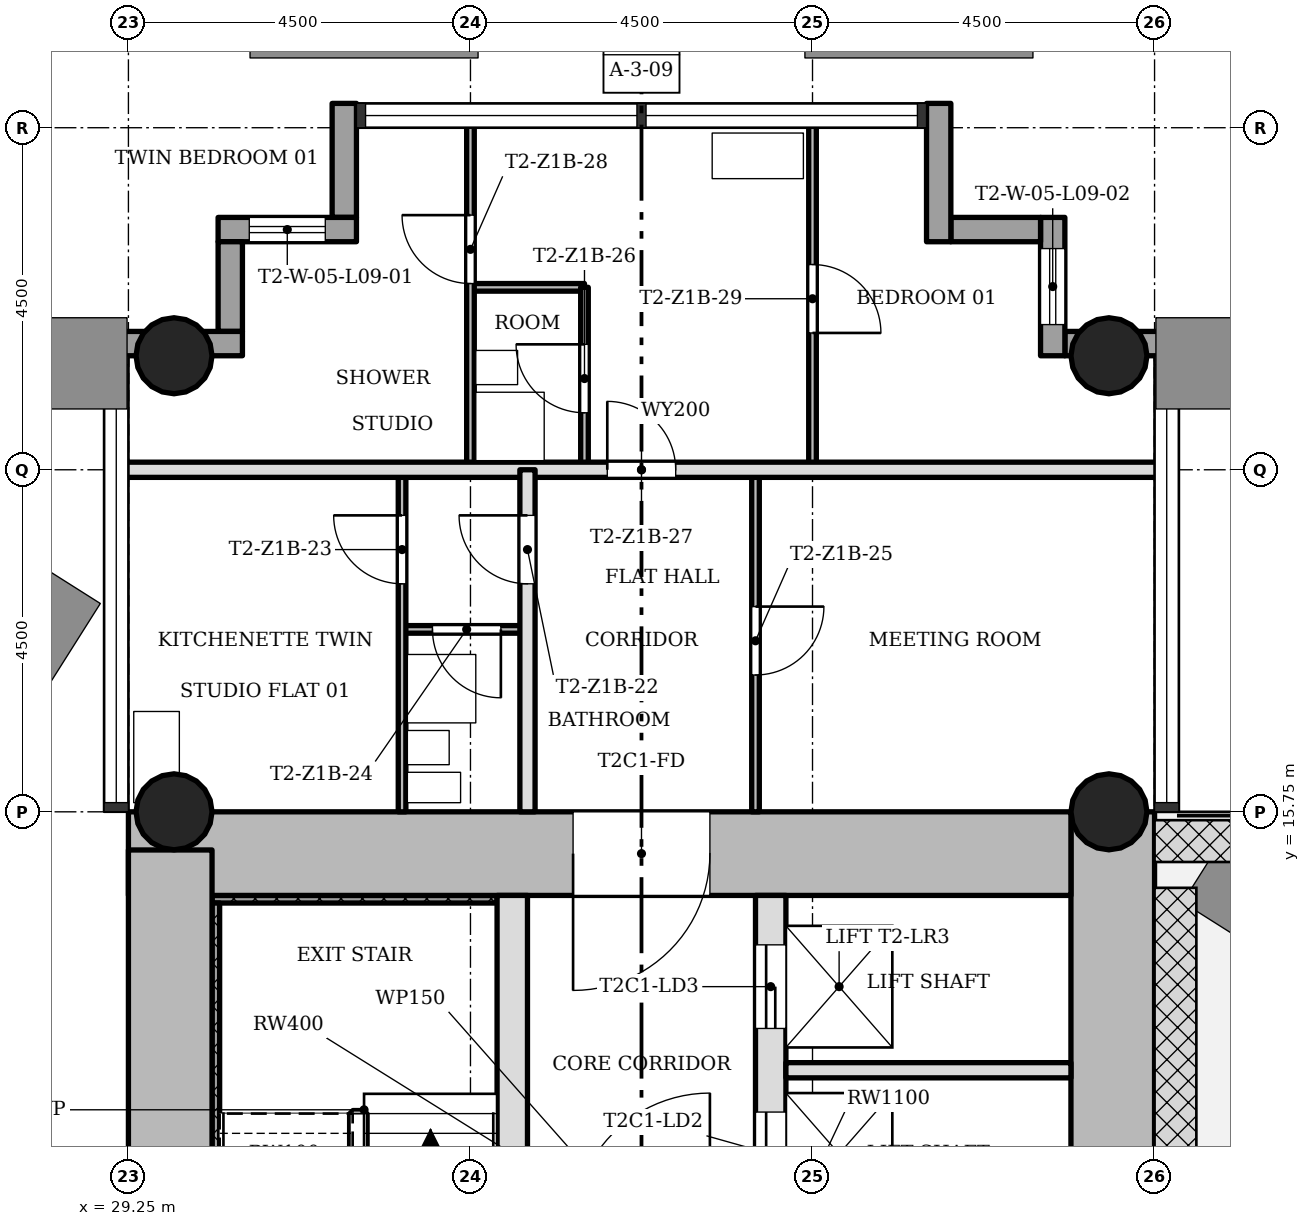
"""IFC4 building model, lengths in metres.
Left out: names, types, materials, properties, quantities, classifications, styles, units other than length and angle.
Written with IfcOpenShell. Run it as: python <this file> out.ifc"""

import sys

from ifc_helpers import new_model, si_unit, direction, frame, frame_2d, origin, origin_2d, place, context, subcontext, project, spatial, rectangle, hollow_circle, extrude, element, fill, save


model = new_model("IFC4")
c1 = context("Model", 3, precision=1e-05, world=origin(), true_north=direction((0.0, 1.0)))
c2 = subcontext(c1, "Body", "Model", "MODEL_VIEW")
j1 = project(units=[si_unit("LENGTHUNIT", "METRE"), si_unit("PLANEANGLEUNIT", "RADIAN")], contexts=[c1])
p1 = place(None, origin())
s1 = spatial("IfcSite", under=j1, at=p1, CompositionType="ELEMENT")
p2 = place(p1, origin())
s2 = spatial("IfcBuilding", under=s1, at=p2, CompositionType="ELEMENT")
p3 = place(p2, frame((0.0, 0.0, 38.1)))
s3 = spatial("IfcBuildingStorey", under=s2, at=p3, CompositionType="ELEMENT", Elevation=38.1)
p4 = place(p3, frame((42.2, 7.85, 0.0), z_axis=(0.0, 0.0, 1.0), x_axis=(0.0, 1.0, 0.0)))
e1 = element("IfcWall", 1, at=p4, inside=s3, PredefinedType="SHEAR", context=c2, shape_type="SweptSolid", body=[
    extrude(rectangle(XDim=7.9, YDim=1.1, at=frame_2d((3.95, 0.0))), origin(), (0.0, 0.0, 1.0), 3.4),
])
p5 = place(p3, frame((41.65, 15.2, 0.0), z_axis=(0.0, 0.0, 1.0), x_axis=(-1.0, 0.0, 0.0)))
e2 = element("IfcWall", 2, at=p5, inside=s3, PredefinedType="SHEAR", context=c2, shape_type="SweptSolid", body=[
    extrude(rectangle(XDim=12.4, YDim=1.1, at=frame_2d((6.2, 0.0))), origin(), (0.0, 0.0, 1.0), 3.4),
])
p6 = place(p5, frame((4.75, 0.0, 0.0)))
e3 = element("IfcOpeningElement", 3, at=p6, cuts=e2, PredefinedType="OPENING", context=c2, shape_type="SweptSolid", body=[
    extrude(rectangle(XDim=1.8, YDim=2.1, at=frame_2d((0.9, 1.05))), frame((0.0, 0.56, 0.0), z_axis=(0.0, -1.0, 0.0), x_axis=(1.0, 0.0, 0.0)), (0.0, 0.0, 1.0), 1.12),
])
p7 = place(p3, frame((29.8, 15.248, 0.0), z_axis=(0.0, 0.0, 1.0), x_axis=(0.0, -1.0, 0.0)))
e4 = element("IfcWall", 4, at=p7, inside=s3, PredefinedType="SHEAR", context=c2, shape_type="SweptSolid", body=[
    extrude(rectangle(XDim=8.596, YDim=1.1, at=frame_2d((4.298, 0.0))), origin(), (0.0, 0.0, 1.0), 3.4),
])
p8 = place(p3, frame((34.3, 7.85, 0.0), z_axis=(0.0, 0.0, 1.0), x_axis=(0.0, 1.0, 0.0)))
e5 = element("IfcWall", 5, at=p8, inside=s3, PredefinedType="SHEAR", context=c2, shape_type="SweptSolid", body=[
    extrude(rectangle(XDim=6.8, YDim=0.4, at=frame_2d((3.4, 0.0))), origin(), (0.0, 0.0, 1.0), 3.4),
])
p9 = place(p8, frame((0.55, 0.0, 0.0)))
e6 = element("IfcOpeningElement", 6, at=p9, cuts=e5, PredefinedType="OPENING", context=c2, shape_type="SweptSolid", body=[
    extrude(rectangle(XDim=0.9, YDim=2.1, at=frame_2d((0.45, 1.05))), frame((0.0, 0.21, 0.0), z_axis=(0.0, -1.0, 0.0), x_axis=(1.0, 0.0, 0.0)), (0.0, 0.0, 1.0), 0.42),
])
p10 = place(p3, frame((37.7, 7.85, 0.0), z_axis=(0.0, 0.0, 1.0), x_axis=(0.0, 1.0, 0.0)))
e7 = element("IfcWall", 7, at=p10, inside=s3, PredefinedType="SHEAR", context=c2, shape_type="SweptSolid", body=[
    extrude(rectangle(XDim=6.8, YDim=0.4, at=frame_2d((3.4, 0.0))), origin(), (0.0, 0.0, 1.0), 3.4),
])
p11 = place(p10, frame((0.65, 0.0, 0.0)))
e8 = element("IfcOpeningElement", 8, at=p11, cuts=e7, PredefinedType="OPENING", context=c2, shape_type="SweptSolid", body=[
    extrude(rectangle(XDim=1.1, YDim=2.1, at=frame_2d((0.55, 1.05))), frame((0.0, 0.21, 0.0), z_axis=(0.0, -1.0, 0.0), x_axis=(1.0, 0.0, 0.0)), (0.0, 0.0, 1.0), 0.42),
])
p12 = place(p10, frame((2.85, 0.0, 0.0)))
e9 = element("IfcOpeningElement", 9, at=p12, cuts=e7, PredefinedType="OPENING", context=c2, shape_type="SweptSolid", body=[
    extrude(rectangle(XDim=1.1, YDim=2.1, at=frame_2d((0.55, 1.05))), frame((0.0, 0.21, 0.0), z_axis=(0.0, -1.0, 0.0), x_axis=(1.0, 0.0, 0.0)), (0.0, 0.0, 1.0), 0.42),
])
p13 = place(p10, frame((5.05, 0.0, 0.0)))
e10 = element("IfcOpeningElement", 10, at=p13, cuts=e7, PredefinedType="OPENING", context=c2, shape_type="SweptSolid", body=[
    extrude(rectangle(XDim=1.1, YDim=2.1, at=frame_2d((0.55, 1.05))), frame((0.0, 0.21, 0.0), z_axis=(0.0, -1.0, 0.0), x_axis=(1.0, 0.0, 0.0)), (0.0, 0.0, 1.0), 0.42),
])
for number, where, z_axis, x_axis in (
    (11, (42.15, 15.75, 0.0), (0.0, 0.0, 1.0), (1.0, 0.0, 0.0)),
    (12, (29.85, 15.75, 0.0), (0.0, 0.0, 1.0), (1.0, 0.0, 0.0)),
    (13, (42.15, 21.75, 0.0), (0.0, 0.0, 1.0), (1.0, 0.0, 0.0)),
    (14, (29.85, 21.75, 0.0), (0.0, 0.0, 1.0), (1.0, 0.0, 0.0)),
):
    element("IfcColumn", number, at=place(p3, frame(where, z_axis=z_axis, x_axis=x_axis)), inside=s3, PredefinedType="COLUMN", context=c2, shape_type="SweptSolid", body=[
        extrude(hollow_circle(Radius=0.5, WallThickness=0.036, at=origin_2d()), origin(), (0.0, 0.0, 1.0), 3.4),
    ])
p14 = place(p3, frame((43.07, 21.91, -0.3), z_axis=(0.0, 0.0, 1.0), x_axis=(-1.0, 0.0, 0.0)))
e15 = element("IfcWall", 15, at=p14, inside=s3, PredefinedType="STANDARD", context=c2, shape_type="SweptSolid", body=[
    extrude(rectangle(XDim=1.5, YDim=0.32, at=frame_2d((0.75, 0.0))), origin(), (0.0, 0.0, 1.0), 3.4),
])
p15 = place(p3, frame((41.41, 21.75, -0.3), z_axis=(0.0, 0.0, 1.0), x_axis=(0.0, 1.0, 0.0)))
e16 = element("IfcWall", 16, at=p15, inside=s3, PredefinedType="STANDARD", context=c2, shape_type="SweptSolid", body=[
    extrude(rectangle(XDim=1.82, YDim=0.32, at=frame_2d((0.91, 0.0))), origin(), (0.0, 0.0, 1.0), 3.4),
])
p16 = place(p15, frame((0.41, 0.0, 1.2)))
e17 = element("IfcOpeningElement", 17, at=p16, cuts=e16, PredefinedType="OPENING", context=c2, shape_type="SweptSolid", body=[
    extrude(rectangle(XDim=1.0, YDim=1.5, at=frame_2d((0.5, 0.75))), frame((0.0, 0.17, 0.0), z_axis=(0.0, -1.0, 0.0), x_axis=(1.0, 0.0, 0.0)), (0.0, 0.0, 1.0), 0.34),
])
p17 = place(p3, frame((41.25, 23.41, -0.3), z_axis=(0.0, 0.0, 1.0), x_axis=(-1.0, 0.0, 0.0)))
e18 = element("IfcWall", 18, at=p17, inside=s3, PredefinedType="STANDARD", context=c2, shape_type="SweptSolid", body=[
    extrude(rectangle(XDim=1.18, YDim=0.32, at=frame_2d((0.59, 0.0))), origin(), (0.0, 0.0, 1.0), 3.4),
])
p18 = place(p3, frame((39.91, 23.25, -0.3), z_axis=(0.0, 0.0, 1.0), x_axis=(0.0, 1.0, 0.0)))
e19 = element("IfcWall", 19, at=p18, inside=s3, PredefinedType="STANDARD", context=c2, shape_type="SweptSolid", body=[
    extrude(rectangle(XDim=1.82, YDim=0.32, at=frame_2d((0.91, 0.0))), origin(), (0.0, 0.0, 1.0), 3.4),
])
p19 = place(p3, frame((32.09, 25.07, -0.3), z_axis=(0.0, 0.0, 1.0), x_axis=(0.0, -1.0, 0.0)))
e20 = element("IfcWall", 20, at=p19, inside=s3, PredefinedType="STANDARD", context=c2, shape_type="SweptSolid", body=[
    extrude(rectangle(XDim=1.5, YDim=0.32, at=frame_2d((0.75, 0.0))), origin(), (0.0, 0.0, 1.0), 3.4),
])
p20 = place(p3, frame((32.25, 23.41, -0.3), z_axis=(0.0, 0.0, 1.0), x_axis=(-1.0, 0.0, 0.0)))
e21 = element("IfcWall", 21, at=p20, inside=s3, PredefinedType="STANDARD", context=c2, shape_type="SweptSolid", body=[
    extrude(rectangle(XDim=1.82, YDim=0.32, at=frame_2d((0.91, 0.0))), origin(), (0.0, 0.0, 1.0), 3.4),
])
p21 = place(p20, frame((0.41, 0.0, 1.2)))
e22 = element("IfcOpeningElement", 22, at=p21, cuts=e21, PredefinedType="OPENING", context=c2, shape_type="SweptSolid", body=[
    extrude(rectangle(XDim=1.0, YDim=1.5, at=frame_2d((0.5, 0.75))), frame((0.0, 0.17, 0.0), z_axis=(0.0, -1.0, 0.0), x_axis=(1.0, 0.0, 0.0)), (0.0, 0.0, 1.0), 0.34),
])
p22 = place(p3, frame((30.59, 23.25, -0.3), z_axis=(0.0, 0.0, 1.0), x_axis=(0.0, -1.0, 0.0)))
e23 = element("IfcWall", 23, at=p22, inside=s3, PredefinedType="STANDARD", context=c2, shape_type="SweptSolid", body=[
    extrude(rectangle(XDim=1.18, YDim=0.32, at=frame_2d((0.59, 0.0))), origin(), (0.0, 0.0, 1.0), 3.4),
])
p23 = place(p3, frame((30.75, 21.91, -0.3), z_axis=(0.0, 0.0, 1.0), x_axis=(-1.0, 0.0, 0.0)))
e24 = element("IfcWall", 24, at=p23, inside=s3, PredefinedType="STANDARD", context=c2, shape_type="SweptSolid", body=[
    extrude(rectangle(XDim=1.82, YDim=0.32, at=frame_2d((0.91, 0.0))), origin(), (0.0, 0.0, 1.0), 3.4),
])
p24 = place(p3, frame((41.65, 12.35, 0.0), z_axis=(0.0, 0.0, 1.0), x_axis=(-1.0, 0.0, 0.0)))
e25 = element("IfcWall", 25, at=p24, inside=s3, PredefinedType="SOLIDWALL", context=c2, shape_type="SweptSolid", body=[
    extrude(rectangle(XDim=3.75, YDim=0.2, at=frame_2d((1.875, 0.0))), origin(), (0.0, 0.0, 1.0), 3.0),
])
p25 = place(p3, frame((34.5, 18.15, 0.0), z_axis=(0.0, 0.0, 1.0), x_axis=(-1.0, 0.0, 0.0)))
e26 = element("IfcWall", 26, at=p25, inside=s3, PredefinedType="PARTITIONING", context=c2, shape_type="SweptSolid", body=[
    extrude(rectangle(XDim=1.65, YDim=0.1, at=frame_2d((0.825, 0.0))), origin(), (0.0, 0.0, 1.0), 3.0),
])
p26 = place(p25, frame((0.35, 0.0, 0.0)))
e27 = element("IfcOpeningElement", 27, at=p26, cuts=e26, PredefinedType="OPENING", context=c2, shape_type="SweptSolid", body=[
    extrude(rectangle(XDim=0.9, YDim=2.1, at=frame_2d((0.45, 1.05))), frame((0.0, 0.06, 0.0), z_axis=(0.0, -1.0, 0.0), x_axis=(1.0, 0.0, 0.0)), (0.0, 0.0, 1.0), 0.12),
])
p27 = place(p3, frame((42.85, 20.25, 0.0), z_axis=(0.0, 0.0, 1.0), x_axis=(-1.0, 0.0, 0.0)))
e28 = element("IfcWall", 28, at=p27, inside=s3, PredefinedType="SOLIDWALL", context=c2, shape_type="SweptSolid", body=[
    extrude(rectangle(XDim=13.7, YDim=0.2, at=frame_2d((6.85, 0.0))), origin(), (0.0, 0.0, 1.0), 3.0),
])
p28 = place(p27, frame((6.4, 0.0, 0.0)))
e29 = element("IfcOpeningElement", 29, at=p28, cuts=e28, PredefinedType="OPENING", context=c2, shape_type="SweptSolid", body=[
    extrude(rectangle(XDim=0.9, YDim=2.1, at=frame_2d((0.45, 1.05))), frame((0.0, 0.11, 0.0), z_axis=(0.0, -1.0, 0.0), x_axis=(1.0, 0.0, 0.0)), (0.0, 0.0, 1.0), 0.22),
])
p29 = place(p3, frame((35.25, 22.65, 0.0), z_axis=(0.0, 0.0, 1.0), x_axis=(-1.0, 0.0, 0.0)))
e30 = element("IfcWall", 30, at=p29, inside=s3, PredefinedType="PARTITIONING", context=c2, shape_type="SweptSolid", body=[
    extrude(rectangle(XDim=1.5, YDim=0.1, at=frame_2d((0.75, 0.0))), origin(), (0.0, 0.0, 1.0), 3.0),
])
p30 = place(p3, frame((38.25, 20.25, 0.0), z_axis=(0.0, 0.0, 1.0), x_axis=(0.0, 1.0, 0.0)))
e31 = element("IfcWall", 31, at=p30, inside=s3, PredefinedType="PARTITIONING", context=c2, shape_type="SweptSolid", body=[
    extrude(rectangle(XDim=4.6, YDim=0.1, at=frame_2d((2.3, 0.0))), origin(), (0.0, 0.0, 1.0), 3.0),
])
p31 = place(p30, frame((1.8, 0.0, 0.0)))
e32 = element("IfcOpeningElement", 32, at=p31, cuts=e31, PredefinedType="OPENING", context=c2, shape_type="SweptSolid", body=[
    extrude(rectangle(XDim=0.9, YDim=2.1, at=frame_2d((0.45, 1.05))), frame((0.0, 0.06, 0.0), z_axis=(0.0, -1.0, 0.0), x_axis=(1.0, 0.0, 0.0)), (0.0, 0.0, 1.0), 0.12),
])
p32 = place(p3, frame((37.5, 15.75, 0.0), z_axis=(0.0, 0.0, 1.0), x_axis=(0.0, 1.0, 0.0)))
e33 = element("IfcWall", 33, at=p32, inside=s3, PredefinedType="PARTITIONING", context=c2, shape_type="SweptSolid", body=[
    extrude(rectangle(XDim=4.5, YDim=0.1, at=frame_2d((2.25, 0.0))), origin(), (0.0, 0.0, 1.0), 3.0),
])
p33 = place(p32, frame((1.8, 0.0, 0.0)))
e34 = element("IfcOpeningElement", 34, at=p33, cuts=e33, PredefinedType="OPENING", context=c2, shape_type="SweptSolid", body=[
    extrude(rectangle(XDim=0.9, YDim=2.1, at=frame_2d((0.45, 1.05))), frame((0.0, 0.06, 0.0), z_axis=(0.0, -1.0, 0.0), x_axis=(1.0, 0.0, 0.0)), (0.0, 0.0, 1.0), 0.12),
])
p34 = place(p3, frame((35.25, 20.25, 0.0), z_axis=(0.0, 0.0, 1.0), x_axis=(0.0, 1.0, 0.0)))
e35 = element("IfcWall", 35, at=p34, inside=s3, PredefinedType="PARTITIONING", context=c2, shape_type="SweptSolid", body=[
    extrude(rectangle(XDim=2.4, YDim=0.1, at=frame_2d((1.2, 0.0))), origin(), (0.0, 0.0, 1.0), 3.0),
])
p35 = place(p34, frame((0.75, 0.0, 0.0)))
e36 = element("IfcOpeningElement", 36, at=p35, cuts=e35, PredefinedType="OPENING", context=c2, shape_type="SweptSolid", body=[
    extrude(rectangle(XDim=0.9, YDim=2.1, at=frame_2d((0.45, 1.05))), frame((0.0, 0.06, 0.0), z_axis=(0.0, -1.0, 0.0), x_axis=(1.0, 0.0, 0.0)), (0.0, 0.0, 1.0), 0.12),
])
p36 = place(p3, frame((34.5, 15.75, 0.0), z_axis=(0.0, 0.0, 1.0), x_axis=(0.0, 1.0, 0.0)))
e37 = element("IfcWall", 37, at=p36, inside=s3, PredefinedType="SOLIDWALL", context=c2, shape_type="SweptSolid", body=[
    extrude(rectangle(XDim=4.5, YDim=0.2, at=frame_2d((2.25, 0.0))), origin(), (0.0, 0.0, 1.0), 3.0),
])
p37 = place(p36, frame((3.0, 0.0, 0.0)))
e38 = element("IfcOpeningElement", 38, at=p37, cuts=e37, PredefinedType="OPENING", context=c2, shape_type="SweptSolid", body=[
    extrude(rectangle(XDim=0.9, YDim=2.1, at=frame_2d((0.45, 1.05))), frame((0.0, 0.11, 0.0), z_axis=(0.0, -1.0, 0.0), x_axis=(1.0, 0.0, 0.0)), (0.0, 0.0, 1.0), 0.22),
])
p38 = place(p3, frame((33.75, 20.25, 0.0), z_axis=(0.0, 0.0, 1.0), x_axis=(0.0, 1.0, 0.0)))
e39 = element("IfcWall", 39, at=p38, inside=s3, PredefinedType="PARTITIONING", context=c2, shape_type="SweptSolid", body=[
    extrude(rectangle(XDim=4.6, YDim=0.1, at=frame_2d((2.3, 0.0))), origin(), (0.0, 0.0, 1.0), 3.0),
])
p39 = place(p38, frame((2.45, 0.0, 0.0)))
e40 = element("IfcOpeningElement", 40, at=p39, cuts=e39, PredefinedType="OPENING", context=c2, shape_type="SweptSolid", body=[
    extrude(rectangle(XDim=0.9, YDim=2.1, at=frame_2d((0.45, 1.05))), frame((0.0, 0.06, 0.0), z_axis=(0.0, -1.0, 0.0), x_axis=(1.0, 0.0, 0.0)), (0.0, 0.0, 1.0), 0.12),
])
p40 = place(p3, frame((32.85, 15.75, 0.0), z_axis=(0.0, 0.0, 1.0), x_axis=(0.0, 1.0, 0.0)))
e41 = element("IfcWall", 41, at=p40, inside=s3, PredefinedType="PARTITIONING", context=c2, shape_type="SweptSolid", body=[
    extrude(rectangle(XDim=4.5, YDim=0.1, at=frame_2d((2.25, 0.0))), origin(), (0.0, 0.0, 1.0), 3.0),
])
p41 = place(p40, frame((3.0, 0.0, 0.0)))
e42 = element("IfcOpeningElement", 42, at=p41, cuts=e41, PredefinedType="OPENING", context=c2, shape_type="SweptSolid", body=[
    extrude(rectangle(XDim=0.9, YDim=2.1, at=frame_2d((0.45, 1.05))), frame((0.0, 0.06, 0.0), z_axis=(0.0, -1.0, 0.0), x_axis=(1.0, 0.0, 0.0)), (0.0, 0.0, 1.0), 0.12),
])
p42 = place(p3, frame((34.1, 14.6, 0.0), z_axis=(0.0, 0.0, 1.0), x_axis=(-1.0, 0.0, 0.0)))
e43 = element("IfcWall", 43, at=p42, inside=s3, PredefinedType="SHEAR", context=c2, shape_type="SweptSolid", body=[
    extrude(rectangle(XDim=3.75, YDim=0.1, at=frame_2d((1.875, 0.0))), origin(), (0.0, 0.0, 1.0), 3.4),
])
p43 = place(p3, frame((30.4, 7.95, 0.0), z_axis=(0.0, 0.0, 1.0), x_axis=(0.0, 1.0, 0.0)))
e44 = element("IfcWall", 44, at=p43, inside=s3, PredefinedType="SHEAR", context=c2, shape_type="SweptSolid", body=[
    extrude(rectangle(XDim=6.6, YDim=0.1, at=frame_2d((3.3, 0.0))), origin(), (0.0, 0.0, 1.0), 3.4),
])
p44 = place(p37, origin())
e45 = element("IfcDoor", 45, at=p44, inside=s3, OperationType="SINGLE_SWING_LEFT", PredefinedType="DOOR", context=c2, shape_type="SweptSolid", body=[
    extrude(rectangle(XDim=0.9, YDim=2.1, at=frame_2d((0.45, 1.05))), frame((0.0, 0.025, 0.0), z_axis=(0.0, -1.0, 0.0), x_axis=(1.0, 0.0, 0.0)), (0.0, 0.0, 1.0), 0.05),
])
fill(e38, e45)
p45 = place(p41, origin())
e46 = element("IfcDoor", 46, at=p45, inside=s3, OperationType="SINGLE_SWING_LEFT", PredefinedType="DOOR", context=c2, shape_type="SweptSolid", body=[
    extrude(rectangle(XDim=0.9, YDim=2.1, at=frame_2d((0.45, 1.05))), frame((0.0, 0.025, 0.0), z_axis=(0.0, -1.0, 0.0), x_axis=(1.0, 0.0, 0.0)), (0.0, 0.0, 1.0), 0.05),
])
fill(e42, e46)
p46 = place(p26, origin())
e47 = element("IfcDoor", 47, at=p46, inside=s3, OperationType="SINGLE_SWING_RIGHT", PredefinedType="DOOR", context=c2, shape_type="SweptSolid", body=[
    extrude(rectangle(XDim=0.9, YDim=2.1, at=frame_2d((0.45, 1.05))), frame((0.0, 0.025, 0.0), z_axis=(0.0, -1.0, 0.0), x_axis=(1.0, 0.0, 0.0)), (0.0, 0.0, 1.0), 0.05),
])
fill(e27, e47)
p47 = place(p33, origin())
e48 = element("IfcDoor", 48, at=p47, inside=s3, OperationType="SINGLE_SWING_RIGHT", PredefinedType="DOOR", context=c2, shape_type="SweptSolid", body=[
    extrude(rectangle(XDim=0.9, YDim=2.1, at=frame_2d((0.45, 1.05))), frame((0.0, 0.025, 0.0), z_axis=(0.0, -1.0, 0.0), x_axis=(1.0, 0.0, 0.0)), (0.0, 0.0, 1.0), 0.05),
])
fill(e34, e48)
p48 = place(p35, origin())
e49 = element("IfcDoor", 49, at=p48, inside=s3, OperationType="SINGLE_SWING_LEFT", PredefinedType="DOOR", context=c2, shape_type="SweptSolid", body=[
    extrude(rectangle(XDim=0.9, YDim=2.1, at=frame_2d((0.45, 1.05))), frame((0.0, 0.025, 0.0), z_axis=(0.0, -1.0, 0.0), x_axis=(1.0, 0.0, 0.0)), (0.0, 0.0, 1.0), 0.05),
])
fill(e36, e49)
p49 = place(p28, origin())
e50 = element("IfcDoor", 50, at=p49, inside=s3, OperationType="SINGLE_SWING_RIGHT", PredefinedType="DOOR", context=c2, shape_type="SweptSolid", body=[
    extrude(rectangle(XDim=0.9, YDim=2.1, at=frame_2d((0.45, 1.05))), frame((0.0, 0.025, 0.0), z_axis=(0.0, -1.0, 0.0), x_axis=(1.0, 0.0, 0.0)), (0.0, 0.0, 1.0), 0.05),
])
fill(e29, e50)
p50 = place(p39, origin())
e51 = element("IfcDoor", 51, at=p50, inside=s3, OperationType="SINGLE_SWING_LEFT", PredefinedType="DOOR", context=c2, shape_type="SweptSolid", body=[
    extrude(rectangle(XDim=0.9, YDim=2.1, at=frame_2d((0.45, 1.05))), frame((0.0, 0.025, 0.0), z_axis=(0.0, -1.0, 0.0), x_axis=(1.0, 0.0, 0.0)), (0.0, 0.0, 1.0), 0.05),
])
fill(e40, e51)
p51 = place(p31, origin())
e52 = element("IfcDoor", 52, at=p51, inside=s3, OperationType="SINGLE_SWING_LEFT", PredefinedType="DOOR", context=c2, shape_type="SweptSolid", body=[
    extrude(rectangle(XDim=0.9, YDim=2.1, at=frame_2d((0.45, 1.05))), frame((0.0, 0.025, 0.0), z_axis=(0.0, -1.0, 0.0), x_axis=(1.0, 0.0, 0.0)), (0.0, 0.0, 1.0), 0.05),
])
fill(e32, e52)
p52 = place(p12, origin())
e53 = element("IfcDoor", 53, at=p52, inside=s3, OperationType="SLIDING_TO_LEFT", PredefinedType="DOOR", context=c2, shape_type="SweptSolid", body=[
    extrude(rectangle(XDim=1.1, YDim=2.1, at=frame_2d((0.55, 1.05))), frame((0.0, 0.025, 0.0), z_axis=(0.0, -1.0, 0.0), x_axis=(1.0, 0.0, 0.0)), (0.0, 0.0, 1.0), 0.05),
])
fill(e9, e53)
p53 = place(p13, origin())
e54 = element("IfcDoor", 54, at=p53, inside=s3, OperationType="SLIDING_TO_LEFT", PredefinedType="DOOR", context=c2, shape_type="SweptSolid", body=[
    extrude(rectangle(XDim=1.1, YDim=2.1, at=frame_2d((0.55, 1.05))), frame((0.0, 0.025, 0.0), z_axis=(0.0, -1.0, 0.0), x_axis=(1.0, 0.0, 0.0)), (0.0, 0.0, 1.0), 0.05),
])
fill(e10, e54)
p54 = place(p6, origin())
e55 = element("IfcDoor", 55, at=p54, inside=s3, OperationType="SINGLE_SWING_LEFT", PredefinedType="DOOR", context=c2, shape_type="SweptSolid", body=[
    extrude(rectangle(XDim=1.8, YDim=2.1, at=frame_2d((0.9, 1.05))), frame((0.0, 0.025, 0.0), z_axis=(0.0, -1.0, 0.0), x_axis=(1.0, 0.0, 0.0)), (0.0, 0.0, 1.0), 0.05),
])
fill(e3, e55)
p55 = place(p21, origin())
e56 = element("IfcWindow", 56, at=p55, inside=s3, PartitioningType="SINGLE_PANEL", PredefinedType="WINDOW", context=c2, shape_type="SweptSolid", body=[
    extrude(rectangle(XDim=1.0, YDim=1.5, at=frame_2d((0.5, 0.75))), frame((0.0, 0.03, 0.0), z_axis=(0.0, -1.0, 0.0), x_axis=(1.0, 0.0, 0.0)), (0.0, 0.0, 1.0), 0.06),
])
fill(e22, e56)
p56 = place(p16, origin())
e57 = element("IfcWindow", 57, at=p56, inside=s3, PartitioningType="SINGLE_PANEL", PredefinedType="WINDOW", context=c2, shape_type="SweptSolid", body=[
    extrude(rectangle(XDim=1.0, YDim=1.5, at=frame_2d((0.5, 0.75))), frame((0.0, 0.03, 0.0), z_axis=(0.0, -1.0, 0.0), x_axis=(1.0, 0.0, 0.0)), (0.0, 0.0, 1.0), 0.06),
])
fill(e17, e57)
save(model, sys.argv[1])
